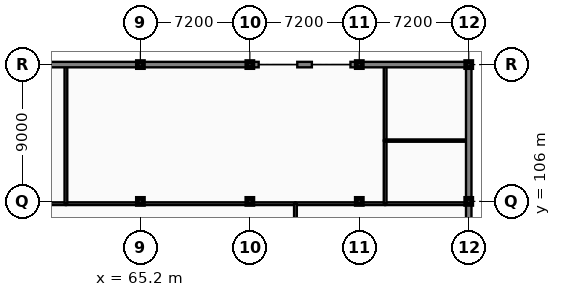
"""IFC4 building model, lengths in metres.
Left out: names, types, materials, properties, quantities, classifications, styles, units other than length and angle.
Written with IfcOpenShell. Run it as: python <this file> out.ifc"""

import sys

from ifc_helpers import new_model, si_unit, direction, frame, frame_2d, origin, origin_2d, place, context, subcontext, project, spatial, rectangle, extrude, element, fill, save


model = new_model("IFC4")
c1 = context("Model", 3, precision=1e-05, world=origin(), true_north=direction((0.0, 1.0)))
c2 = subcontext(c1, "Body", "Model", "MODEL_VIEW")
j1 = project(units=[si_unit("LENGTHUNIT", "METRE"), si_unit("PLANEANGLEUNIT", "RADIAN")], contexts=[c1])
p1 = place(None, origin())
s1 = spatial("IfcSite", under=j1, at=p1, CompositionType="ELEMENT")
p2 = place(p1, origin())
s2 = spatial("IfcBuilding", under=s1, at=p2, CompositionType="ELEMENT")
p3 = place(p2, frame((0.0, 0.0, 17.7)))
s3 = spatial("IfcBuildingStorey", under=s2, at=p3, CompositionType="ELEMENT", Elevation=17.7)
for number, where, z_axis, x_axis in (
    (1, (65.2, 106.0, 0.0), (0.0, 0.0, 1.0), (1.0, 0.0, 0.0)),
    (2, (65.2, 115.0, 0.0), (0.0, 0.0, 1.0), (1.0, 0.0, 0.0)),
    (3, (72.4, 106.0, 0.0), (0.0, 0.0, 1.0), (1.0, 0.0, 0.0)),
    (4, (72.4, 115.0, 0.0), (0.0, 0.0, 1.0), (1.0, 0.0, 0.0)),
    (5, (79.6, 106.0, 0.0), (0.0, 0.0, 1.0), (1.0, 0.0, 0.0)),
    (6, (79.6, 115.0, 0.0), (0.0, 0.0, 1.0), (1.0, 0.0, 0.0)),
    (7, (86.8, 106.0, 0.0), (0.0, 0.0, 1.0), (1.0, 0.0, 0.0)),
    (8, (86.8, 115.0, 0.0), (0.0, 0.0, 1.0), (1.0, 0.0, 0.0)),
):
    element("IfcColumn", number, at=place(p3, frame(where, z_axis=z_axis, x_axis=x_axis)), inside=s3, PredefinedType="COLUMN", context=c2, shape_type="SweptSolid", body=[
        extrude(rectangle(XDim=0.4, YDim=0.4, at=origin_2d()), origin(), (0.0, 0.0, 1.0), 3.9),
    ])
p4 = place(p3, frame((54.55, 105.85, 0.0), z_axis=(0.0, 0.0, 1.0), x_axis=(1.0, 0.0, 0.0)))
e9 = element("IfcWall", 9, at=p4, inside=s3, PredefinedType="PARTITIONING", context=c2, shape_type="SweptSolid", body=[
    extrude(rectangle(XDim=5.75, YDim=0.18, at=frame_2d((2.875, 0.0))), origin(), (0.0, 0.0, 1.0), 3.3),
])
p5 = place(p3, frame((60.3, 105.85, 0.0), z_axis=(0.0, 0.0, 1.0), x_axis=(1.0, 0.0, 0.0)))
e10 = element("IfcWall", 10, at=p5, inside=s3, PredefinedType="PARTITIONING", context=c2, shape_type="SweptSolid", body=[
    extrude(rectangle(XDim=15.1, YDim=0.18, at=frame_2d((7.55, 0.0))), origin(), (0.0, 0.0, 1.0), 3.21),
])
p6 = place(p5, frame((7.05, 0.0, -0.01)))
e11 = element("IfcOpeningElement", 11, at=p6, cuts=e10, PredefinedType="OPENING", context=c2, shape_type="SweptSolid", body=[
    extrude(rectangle(XDim=1.0, YDim=2.16, at=frame_2d((0.5, 1.08))), frame((0.0, 0.1, 0.0), z_axis=(0.0, -1.0, 0.0), x_axis=(1.0, 0.0, 0.0)), (0.0, 0.0, 1.0), 0.2),
])
p7 = place(p3, frame((75.4, 105.85, 0.0), z_axis=(0.0, 0.0, 1.0), x_axis=(1.0, 0.0, 0.0)))
e12 = element("IfcWall", 12, at=p7, inside=s3, PredefinedType="PARTITIONING", context=c2, shape_type="SweptSolid", body=[
    extrude(rectangle(XDim=5.9, YDim=0.18, at=frame_2d((2.95, 0.0))), origin(), (0.0, 0.0, 1.0), 3.21),
])
p8 = place(p3, frame((81.3, 105.85, 0.0), z_axis=(0.0, 0.0, 1.0), x_axis=(1.0, 0.0, 0.0)))
e13 = element("IfcWall", 13, at=p8, inside=s3, PredefinedType="PARTITIONING", context=c2, shape_type="SweptSolid", body=[
    extrude(rectangle(XDim=5.36, YDim=0.18, at=frame_2d((2.68, 0.0))), origin(), (0.0, 0.0, 1.0), 3.21),
])
p9 = place(p8, frame((2.18, 0.0, -0.01)))
e14 = element("IfcOpeningElement", 14, at=p9, cuts=e13, PredefinedType="OPENING", context=c2, shape_type="SweptSolid", body=[
    extrude(rectangle(XDim=1.0, YDim=2.16, at=frame_2d((0.5, 1.08))), frame((0.0, 0.1, 0.0), z_axis=(0.0, -1.0, 0.0), x_axis=(1.0, 0.0, 0.0)), (0.0, 0.0, 1.0), 0.2),
])
p10 = place(p3, frame((60.3, 105.85, 0.0), z_axis=(0.0, 0.0, 1.0), x_axis=(0.0, 1.0, 0.0)))
e15 = element("IfcWall", 15, at=p10, inside=s3, PredefinedType="PARTITIONING", context=c2, shape_type="SweptSolid", body=[
    extrude(rectangle(XDim=9.01, YDim=0.18, at=frame_2d((4.505, 0.0))), origin(), (0.0, 0.0, 1.0), 3.21),
])
p11 = place(p3, frame((81.3, 105.85, 0.0), z_axis=(0.0, 0.0, 1.0), x_axis=(0.0, 1.0, 0.0)))
e16 = element("IfcWall", 16, at=p11, inside=s3, PredefinedType="PARTITIONING", context=c2, shape_type="SweptSolid", body=[
    extrude(rectangle(XDim=4.15, YDim=0.18, at=frame_2d((2.075, 0.0))), origin(), (0.0, 0.0, 1.0), 3.3),
])
p12 = place(p11, frame((1.575, 0.0, -0.01)))
e17 = element("IfcOpeningElement", 17, at=p12, cuts=e16, PredefinedType="OPENING", context=c2, shape_type="SweptSolid", body=[
    extrude(rectangle(XDim=1.0, YDim=2.16, at=frame_2d((0.5, 1.08))), frame((0.0, 0.1, 0.0), z_axis=(0.0, -1.0, 0.0), x_axis=(1.0, 0.0, 0.0)), (0.0, 0.0, 1.0), 0.2),
])
p13 = place(p3, frame((81.3, 110.0, 0.0), z_axis=(0.0, 0.0, 1.0), x_axis=(0.0, 1.0, 0.0)))
e18 = element("IfcWall", 18, at=p13, inside=s3, PredefinedType="PARTITIONING", context=c2, shape_type="SweptSolid", body=[
    extrude(rectangle(XDim=4.86, YDim=0.18, at=frame_2d((2.43, 0.0))), origin(), (0.0, 0.0, 1.0), 3.45),
])
p14 = place(p13, frame((1.93, 0.0, -0.01)))
e19 = element("IfcOpeningElement", 19, at=p14, cuts=e18, PredefinedType="OPENING", context=c2, shape_type="SweptSolid", body=[
    extrude(rectangle(XDim=1.0, YDim=2.16, at=frame_2d((0.5, 1.08))), frame((0.0, 0.1, 0.0), z_axis=(0.0, -1.0, 0.0), x_axis=(1.0, 0.0, 0.0)), (0.0, 0.0, 1.0), 0.2),
])
p15 = place(p3, frame((81.3, 110.0, 0.0), z_axis=(0.0, 0.0, 1.0), x_axis=(1.0, 0.0, 0.0)))
e20 = element("IfcWall", 20, at=p15, inside=s3, PredefinedType="PARTITIONING", context=c2, shape_type="SweptSolid", body=[
    extrude(rectangle(XDim=5.36, YDim=0.15, at=frame_2d((2.68, 0.0))), origin(), (0.0, 0.0, 1.0), 3.21),
])
p16 = place(p3, frame((75.4, 97.5, 0.0), z_axis=(0.0, 0.0, 1.0), x_axis=(0.0, 1.0, 0.0)))
e21 = element("IfcWall", 21, at=p16, inside=s3, PredefinedType="PARTITIONING", context=c2, shape_type="SweptSolid", body=[
    extrude(rectangle(XDim=8.35, YDim=0.18, at=frame_2d((4.175, 0.0))), origin(), (0.0, 0.0, 1.0), 3.3),
])
p17 = place(p3, frame((65.2, 115.0, 0.0), z_axis=(0.0, 0.0, 1.0), x_axis=(-1.0, 0.0, 0.0)))
e22 = element("IfcWall", 22, at=p17, inside=s3, PredefinedType="SOLIDWALL", context=c2, shape_type="SweptSolid", body=[
    extrude(rectangle(XDim=7.2, YDim=0.36, at=frame_2d((3.6, 0.0))), origin(), (0.0, 0.0, 1.0), 3.21),
])
p18 = place(p17, frame((0.46, 0.0, 0.75)))
e23 = element("IfcOpeningElement", 23, at=p18, cuts=e22, PredefinedType="OPENING", context=c2, shape_type="SweptSolid", body=[
    extrude(rectangle(XDim=1.55, YDim=2.3, at=frame_2d((0.775, 1.15))), frame((0.0, 0.19, 0.0), z_axis=(0.0, -1.0, 0.0), x_axis=(1.0, 0.0, 0.0)), (0.0, 0.0, 1.0), 0.38),
])
p19 = place(p17, frame((3.06, 0.0, 0.75)))
e24 = element("IfcOpeningElement", 24, at=p19, cuts=e22, PredefinedType="OPENING", context=c2, shape_type="SweptSolid", body=[
    extrude(rectangle(XDim=1.55, YDim=2.3, at=frame_2d((0.775, 1.15))), frame((0.0, 0.19, 0.0), z_axis=(0.0, -1.0, 0.0), x_axis=(1.0, 0.0, 0.0)), (0.0, 0.0, 1.0), 0.38),
])
p20 = place(p3, frame((72.4, 115.0, 0.0), z_axis=(0.0, 0.0, 1.0), x_axis=(-1.0, 0.0, 0.0)))
e25 = element("IfcWall", 25, at=p20, inside=s3, PredefinedType="SOLIDWALL", context=c2, shape_type="SweptSolid", body=[
    extrude(rectangle(XDim=7.2, YDim=0.36, at=frame_2d((3.6, 0.0))), origin(), (0.0, 0.0, 1.0), 3.21),
])
p21 = place(p20, frame((0.46, 0.0, 0.75)))
e26 = element("IfcOpeningElement", 26, at=p21, cuts=e25, PredefinedType="OPENING", context=c2, shape_type="SweptSolid", body=[
    extrude(rectangle(XDim=1.55, YDim=2.3, at=frame_2d((0.775, 1.15))), frame((0.0, 0.19, 0.0), z_axis=(0.0, -1.0, 0.0), x_axis=(1.0, 0.0, 0.0)), (0.0, 0.0, 1.0), 0.38),
])
p22 = place(p20, frame((5.06, 0.0, 0.75)))
e27 = element("IfcOpeningElement", 27, at=p22, cuts=e25, PredefinedType="OPENING", context=c2, shape_type="SweptSolid", body=[
    extrude(rectangle(XDim=1.55, YDim=2.3, at=frame_2d((0.775, 1.15))), frame((0.0, 0.19, 0.0), z_axis=(0.0, -1.0, 0.0), x_axis=(1.0, 0.0, 0.0)), (0.0, 0.0, 1.0), 0.38),
])
p23 = place(p3, frame((76.48, 115.0, 0.0), z_axis=(0.0, 0.0, 1.0), x_axis=(-1.0, 0.0, 0.0)))
e28 = element("IfcWall", 28, at=p23, inside=s3, PredefinedType="SOLIDWALL", context=c2, shape_type="SweptSolid", body=[
    extrude(rectangle(XDim=0.96, YDim=0.36, at=frame_2d((0.48, 0.0))), origin(), (0.0, 0.0, 1.0), 3.21),
])
for number, where, z_axis, x_axis in (
    (29, (79.47, 115.0, 0.0), (0.0, 0.0, 1.0), (-1.0, 0.0, 0.0)),
    (30, (72.98, 115.0, 0.0), (0.0, 0.0, 1.0), (-1.0, 0.0, 0.0)),
):
    element("IfcWall", number, at=place(p3, frame(where, z_axis=z_axis, x_axis=x_axis)), inside=s3, PredefinedType="SOLIDWALL", context=c2, shape_type="SweptSolid", body=[
        extrude(rectangle(XDim=0.45, YDim=0.36, at=frame_2d((0.225, 0.0))), origin(), (0.0, 0.0, 1.0), 3.21),
    ])
p24 = place(p3, frame((86.8, 115.0, 0.0), z_axis=(0.0, 0.0, 1.0), x_axis=(-1.0, 0.0, 0.0)))
e31 = element("IfcWall", 31, at=p24, inside=s3, PredefinedType="SOLIDWALL", context=c2, shape_type="SweptSolid", body=[
    extrude(rectangle(XDim=7.2, YDim=0.36, at=frame_2d((3.6, 0.0))), origin(), (0.0, 0.0, 1.0), 3.21),
])
p25 = place(p24, frame((0.46, 0.0, 0.75)))
e32 = element("IfcOpeningElement", 32, at=p25, cuts=e31, PredefinedType="OPENING", context=c2, shape_type="SweptSolid", body=[
    extrude(rectangle(XDim=1.55, YDim=2.3, at=frame_2d((0.775, 1.15))), frame((0.0, 0.19, 0.0), z_axis=(0.0, -1.0, 0.0), x_axis=(1.0, 0.0, 0.0)), (0.0, 0.0, 1.0), 0.38),
])
p26 = place(p24, frame((3.66, 0.0, 0.75)))
e33 = element("IfcOpeningElement", 33, at=p26, cuts=e31, PredefinedType="OPENING", context=c2, shape_type="SweptSolid", body=[
    extrude(rectangle(XDim=1.55, YDim=2.3, at=frame_2d((0.775, 1.15))), frame((0.0, 0.19, 0.0), z_axis=(0.0, -1.0, 0.0), x_axis=(1.0, 0.0, 0.0)), (0.0, 0.0, 1.0), 0.38),
])
p27 = place(p3, frame((86.8, 97.6, 0.0), z_axis=(0.0, 0.0, 1.0), x_axis=(0.0, 1.0, 0.0)))
e34 = element("IfcWall", 34, at=p27, inside=s3, PredefinedType="SOLIDWALL", context=c2, shape_type="SweptSolid", body=[
    extrude(rectangle(XDim=8.4, YDim=0.36, at=frame_2d((4.2, 0.0))), origin(), (0.0, 0.0, 1.0), 3.3),
])
p28 = place(p27, frame((0.46, 0.0, 0.75)))
e35 = element("IfcOpeningElement", 35, at=p28, cuts=e34, PredefinedType="OPENING", context=c2, shape_type="SweptSolid", body=[
    extrude(rectangle(XDim=1.55, YDim=2.3, at=frame_2d((0.775, 1.15))), frame((0.0, 0.19, 0.0), z_axis=(0.0, -1.0, 0.0), x_axis=(1.0, 0.0, 0.0)), (0.0, 0.0, 1.0), 0.38),
])
p29 = place(p27, frame((6.26, 0.0, 0.75)))
e36 = element("IfcOpeningElement", 36, at=p29, cuts=e34, PredefinedType="OPENING", context=c2, shape_type="SweptSolid", body=[
    extrude(rectangle(XDim=1.55, YDim=2.3, at=frame_2d((0.775, 1.15))), frame((0.0, 0.19, 0.0), z_axis=(0.0, -1.0, 0.0), x_axis=(1.0, 0.0, 0.0)), (0.0, 0.0, 1.0), 0.38),
])
p30 = place(p3, frame((86.8, 106.0, 0.0), z_axis=(0.0, 0.0, 1.0), x_axis=(0.0, 1.0, 0.0)))
e37 = element("IfcWall", 37, at=p30, inside=s3, PredefinedType="SOLIDWALL", context=c2, shape_type="SweptSolid", body=[
    extrude(rectangle(XDim=9.0, YDim=0.36, at=frame_2d((4.5, 0.0))), origin(), (0.0, 0.0, 1.0), 3.3),
])
p31 = place(p30, frame((0.46, 0.0, 0.75)))
e38 = element("IfcOpeningElement", 38, at=p31, cuts=e37, PredefinedType="OPENING", context=c2, shape_type="SweptSolid", body=[
    extrude(rectangle(XDim=1.55, YDim=2.3, at=frame_2d((0.775, 1.15))), frame((0.0, 0.19, 0.0), z_axis=(0.0, -1.0, 0.0), x_axis=(1.0, 0.0, 0.0)), (0.0, 0.0, 1.0), 0.38),
])
p32 = place(p30, frame((6.86, 0.0, 0.75)))
e39 = element("IfcOpeningElement", 39, at=p32, cuts=e37, PredefinedType="OPENING", context=c2, shape_type="SweptSolid", body=[
    extrude(rectangle(XDim=1.55, YDim=2.3, at=frame_2d((0.775, 1.15))), frame((0.0, 0.19, 0.0), z_axis=(0.0, -1.0, 0.0), x_axis=(1.0, 0.0, 0.0)), (0.0, 0.0, 1.0), 0.38),
])
p33 = place(p6, frame((1.0, 0.0, 0.01), z_axis=(0.0, 0.0, 1.0), x_axis=(-1.0, 0.0, 0.0)))
e40 = element("IfcDoor", 40, at=p33, inside=s3, OperationType="SINGLE_SWING_LEFT", PredefinedType="DOOR", context=c2, shape_type="SweptSolid", body=[
    extrude(rectangle(XDim=1.0, YDim=2.15, at=frame_2d((0.5, 1.075))), frame((0.0, 0.025, 0.0), z_axis=(0.0, -1.0, 0.0), x_axis=(1.0, 0.0, 0.0)), (0.0, 0.0, 1.0), 0.05),
])
fill(e11, e40)
p34 = place(p9, frame((0.0, 0.0, 0.01)))
e41 = element("IfcDoor", 41, at=p34, inside=s3, OperationType="SINGLE_SWING_RIGHT", PredefinedType="DOOR", context=c2, shape_type="SweptSolid", body=[
    extrude(rectangle(XDim=1.0, YDim=2.15, at=frame_2d((0.5, 1.075))), frame((0.0, 0.025, 0.0), z_axis=(0.0, -1.0, 0.0), x_axis=(1.0, 0.0, 0.0)), (0.0, 0.0, 1.0), 0.05),
])
fill(e14, e41)
p35 = place(p12, frame((0.0, 0.0, 0.01)))
e42 = element("IfcDoor", 42, at=p35, inside=s3, OperationType="SINGLE_SWING_LEFT", PredefinedType="DOOR", context=c2, shape_type="SweptSolid", body=[
    extrude(rectangle(XDim=1.0, YDim=2.15, at=frame_2d((0.5, 1.075))), frame((0.0, 0.025, 0.0), z_axis=(0.0, -1.0, 0.0), x_axis=(1.0, 0.0, 0.0)), (0.0, 0.0, 1.0), 0.05),
])
fill(e17, e42)
p36 = place(p14, frame((1.0, 0.0, 0.01), z_axis=(0.0, 0.0, 1.0), x_axis=(-1.0, 0.0, 0.0)))
e43 = element("IfcDoor", 43, at=p36, inside=s3, OperationType="SINGLE_SWING_RIGHT", PredefinedType="DOOR", context=c2, shape_type="SweptSolid", body=[
    extrude(rectangle(XDim=1.0, YDim=2.15, at=frame_2d((0.5, 1.075))), frame((0.0, 0.025, 0.0), z_axis=(0.0, -1.0, 0.0), x_axis=(1.0, 0.0, 0.0)), (0.0, 0.0, 1.0), 0.05),
])
fill(e19, e43)
p37 = place(p18, origin())
e44 = element("IfcWindow", 44, at=p37, inside=s3, PartitioningType="DOUBLE_PANEL_HORIZONTAL", PredefinedType="WINDOW", context=c2, shape_type="SweptSolid", body=[
    extrude(rectangle(XDim=1.55, YDim=2.3, at=frame_2d((0.775, 1.15))), frame((0.0, 0.03, 0.0), z_axis=(0.0, -1.0, 0.0), x_axis=(1.0, 0.0, 0.0)), (0.0, 0.0, 1.0), 0.06),
])
fill(e23, e44)
p38 = place(p19, origin())
e45 = element("IfcWindow", 45, at=p38, inside=s3, PartitioningType="DOUBLE_PANEL_HORIZONTAL", PredefinedType="WINDOW", context=c2, shape_type="SweptSolid", body=[
    extrude(rectangle(XDim=1.55, YDim=2.3, at=frame_2d((0.775, 1.15))), frame((0.0, 0.03, 0.0), z_axis=(0.0, -1.0, 0.0), x_axis=(1.0, 0.0, 0.0)), (0.0, 0.0, 1.0), 0.06),
])
fill(e24, e45)
p39 = place(p21, origin())
e46 = element("IfcWindow", 46, at=p39, inside=s3, PartitioningType="DOUBLE_PANEL_HORIZONTAL", PredefinedType="WINDOW", context=c2, shape_type="SweptSolid", body=[
    extrude(rectangle(XDim=1.55, YDim=2.3, at=frame_2d((0.775, 1.15))), frame((0.0, 0.03, 0.0), z_axis=(0.0, -1.0, 0.0), x_axis=(1.0, 0.0, 0.0)), (0.0, 0.0, 1.0), 0.06),
])
fill(e26, e46)
p40 = place(p22, origin())
e47 = element("IfcWindow", 47, at=p40, inside=s3, PartitioningType="DOUBLE_PANEL_HORIZONTAL", PredefinedType="WINDOW", context=c2, shape_type="SweptSolid", body=[
    extrude(rectangle(XDim=1.55, YDim=2.3, at=frame_2d((0.775, 1.15))), frame((0.0, 0.03, 0.0), z_axis=(0.0, -1.0, 0.0), x_axis=(1.0, 0.0, 0.0)), (0.0, 0.0, 1.0), 0.06),
])
fill(e27, e47)
p41 = place(p25, origin())
e48 = element("IfcWindow", 48, at=p41, inside=s3, PartitioningType="DOUBLE_PANEL_HORIZONTAL", PredefinedType="WINDOW", context=c2, shape_type="SweptSolid", body=[
    extrude(rectangle(XDim=1.55, YDim=2.3, at=frame_2d((0.775, 1.15))), frame((0.0, 0.03, 0.0), z_axis=(0.0, -1.0, 0.0), x_axis=(1.0, 0.0, 0.0)), (0.0, 0.0, 1.0), 0.06),
])
fill(e32, e48)
p42 = place(p26, origin())
e49 = element("IfcWindow", 49, at=p42, inside=s3, PartitioningType="DOUBLE_PANEL_HORIZONTAL", PredefinedType="WINDOW", context=c2, shape_type="SweptSolid", body=[
    extrude(rectangle(XDim=1.55, YDim=2.3, at=frame_2d((0.775, 1.15))), frame((0.0, 0.03, 0.0), z_axis=(0.0, -1.0, 0.0), x_axis=(1.0, 0.0, 0.0)), (0.0, 0.0, 1.0), 0.06),
])
fill(e33, e49)
p43 = place(p29, origin())
e50 = element("IfcWindow", 50, at=p43, inside=s3, PartitioningType="DOUBLE_PANEL_HORIZONTAL", PredefinedType="WINDOW", context=c2, shape_type="SweptSolid", body=[
    extrude(rectangle(XDim=1.55, YDim=2.3, at=frame_2d((0.775, 1.15))), frame((0.0, 0.03, 0.0), z_axis=(0.0, -1.0, 0.0), x_axis=(1.0, 0.0, 0.0)), (0.0, 0.0, 1.0), 0.06),
])
fill(e36, e50)
p44 = place(p31, origin())
e51 = element("IfcWindow", 51, at=p44, inside=s3, PartitioningType="DOUBLE_PANEL_HORIZONTAL", PredefinedType="WINDOW", context=c2, shape_type="SweptSolid", body=[
    extrude(rectangle(XDim=1.55, YDim=2.3, at=frame_2d((0.775, 1.15))), frame((0.0, 0.03, 0.0), z_axis=(0.0, -1.0, 0.0), x_axis=(1.0, 0.0, 0.0)), (0.0, 0.0, 1.0), 0.06),
])
fill(e38, e51)
p45 = place(p32, origin())
e52 = element("IfcWindow", 52, at=p45, inside=s3, PartitioningType="DOUBLE_PANEL_HORIZONTAL", PredefinedType="WINDOW", context=c2, shape_type="SweptSolid", body=[
    extrude(rectangle(XDim=1.55, YDim=2.3, at=frame_2d((0.775, 1.15))), frame((0.0, 0.03, 0.0), z_axis=(0.0, -1.0, 0.0), x_axis=(1.0, 0.0, 0.0)), (0.0, 0.0, 1.0), 0.06),
])
fill(e39, e52)
save(model, sys.argv[1])
